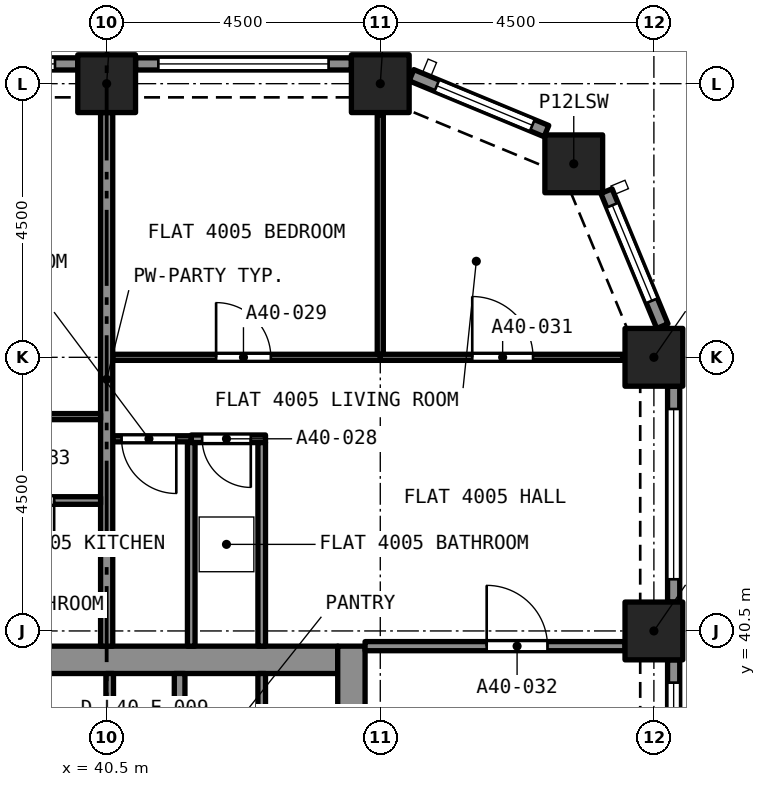
"""IFC4 building model, lengths in metres.
Left out: names, types, materials, properties, quantities, classifications, styles, units other than length and angle.
Written with IfcOpenShell. Run it as: python <this file> out.ifc"""

import sys

from ifc_helpers import new_model, si_unit, direction, frame, frame_2d, origin, origin_2d, place, context, subcontext, project, spatial, rectangle, extrude, element, fill, save


model = new_model("IFC4")
c1 = context("Model", 3, precision=1e-05, world=origin(), true_north=direction((0.0, 1.0)))
c2 = subcontext(c1, "Body", "Model", "MODEL_VIEW")
j1 = project(units=[si_unit("LENGTHUNIT", "METRE"), si_unit("PLANEANGLEUNIT", "RADIAN")], contexts=[c1])
p1 = place(None, origin())
s1 = spatial("IfcSite", under=j1, at=p1, CompositionType="ELEMENT")
p2 = place(p1, origin())
s2 = spatial("IfcBuilding", under=s1, at=p2, CompositionType="ELEMENT")
p3 = place(p2, frame((0.0, 0.0, 143.0)))
s3 = spatial("IfcBuildingStorey", under=s2, at=p3, CompositionType="ELEMENT", Elevation=143.0)
for number, where, z_axis, x_axis in (
    (1, (49.5, 40.5, 0.0), (0.0, 0.0, 1.0), (1.0, 0.0, 0.0)),
    (2, (49.5, 45.0, 0.0), (0.0, 0.0, 1.0), (1.0, 0.0, 0.0)),
    (3, (48.182, 48.182, 0.0), (0.0, 0.0, 1.0), (1.0, 0.0, 0.0)),
    (4, (40.5, 49.5, 0.0), (0.0, 0.0, 1.0), (1.0, 0.0, 0.0)),
    (5, (45.0, 49.5, 0.0), (0.0, 0.0, 1.0), (1.0, 0.0, 0.0)),
):
    element("IfcColumn", number, at=place(p3, frame(where, z_axis=z_axis, x_axis=x_axis)), inside=s3, PredefinedType="COLUMN", context=c2, shape_type="SweptSolid", body=[
        extrude(rectangle(XDim=0.95, YDim=0.95, at=origin_2d()), origin(), (0.0, 0.0, 1.0), 3.2),
    ])
p4 = place(p3, frame((36.7, 40.025, 0.0), z_axis=(0.0, 0.0, 1.0), x_axis=(1.0, 0.0, 0.0)))
e6 = element("IfcWall", 6, at=p4, inside=s3, PredefinedType="SOLIDWALL", context=c2, shape_type="SweptSolid", body=[
    extrude(rectangle(XDim=7.6, YDim=0.45, at=frame_2d((3.8, 0.0))), origin(), (0.0, 0.0, 1.0), 3.2),
])
p5 = place(p3, frame((44.525, 27.25, 0.0), z_axis=(0.0, 0.0, 1.0), x_axis=(0.0, 1.0, 0.0)))
e7 = element("IfcWall", 7, at=p5, inside=s3, PredefinedType="SOLIDWALL", context=c2, shape_type="SweptSolid", body=[
    extrude(rectangle(XDim=13.0, YDim=0.45, at=frame_2d((6.5, 0.0))), origin(), (0.0, 0.0, 1.0), 3.2),
])
p6 = place(p5, frame((8.7, 0.0, 0.0)))
e8 = element("IfcOpeningElement", 8, at=p6, cuts=e7, PredefinedType="OPENING", context=c2, shape_type="SweptSolid", body=[
    extrude(rectangle(XDim=1.2, YDim=2.1, at=frame_2d((0.6, 1.05))), frame((0.0, 0.235, 0.0), z_axis=(0.0, -1.0, 0.0), x_axis=(1.0, 0.0, 0.0)), (0.0, 0.0, 1.0), 0.47),
])
p7 = place(p3, frame((49.825, 40.025, 0.0), z_axis=(0.0, 0.0, 1.0), x_axis=(0.0, -1.0, 0.0)))
e9 = element("IfcWall", 9, at=p7, inside=s3, PredefinedType="SOLIDWALL", context=c2, shape_type="SweptSolid", body=[
    extrude(rectangle(XDim=3.55, YDim=0.2, at=frame_2d((1.775, 0.0))), origin(), (0.0, 0.0, 1.0), 3.2),
])
p8 = place(p7, frame((0.375, 0.0, 0.45)))
e10 = element("IfcOpeningElement", 10, at=p8, cuts=e9, PredefinedType="OPENING", context=c2, shape_type="SweptSolid", body=[
    extrude(rectangle(XDim=2.8, YDim=1.95, at=frame_2d((1.4, 0.975))), frame((0.0, 0.11, 0.0), z_axis=(0.0, -1.0, 0.0), x_axis=(1.0, 0.0, 0.0)), (0.0, 0.0, 1.0), 0.22),
])
p9 = place(p3, frame((49.825, 44.525, 0.0), z_axis=(0.0, 0.0, 1.0), x_axis=(0.0, -1.0, 0.0)))
e11 = element("IfcWall", 11, at=p9, inside=s3, PredefinedType="SOLIDWALL", context=c2, shape_type="SweptSolid", body=[
    extrude(rectangle(XDim=3.55, YDim=0.2, at=frame_2d((1.775, 0.0))), origin(), (0.0, 0.0, 1.0), 3.2),
])
p10 = place(p9, frame((0.375, 0.0, 0.45)))
e12 = element("IfcOpeningElement", 12, at=p10, cuts=e11, PredefinedType="OPENING", context=c2, shape_type="SweptSolid", body=[
    extrude(rectangle(XDim=2.8, YDim=1.95, at=frame_2d((1.4, 0.975))), frame((0.0, 0.11, 0.0), z_axis=(0.0, -1.0, 0.0), x_axis=(1.0, 0.0, 0.0)), (0.0, 0.0, 1.0), 0.22),
])
p11 = place(p3, frame((48.72, 47.733, 0.0), z_axis=(0.0, 0.0, 1.0), x_axis=(0.382680855588, -0.923880599843, 0.0)))
e13 = element("IfcWall", 13, at=p11, inside=s3, PredefinedType="SOLIDWALL", context=c2, shape_type="SweptSolid", body=[
    extrude(rectangle(XDim=2.403, YDim=0.2, at=frame_2d((1.201, 0.0))), origin(), (0.0, 0.0, 1.0), 3.2),
])
p12 = place(p11, frame((0.251, 0.0, 0.45)))
e14 = element("IfcOpeningElement", 14, at=p12, cuts=e13, PredefinedType="OPENING", context=c2, shape_type="SweptSolid", body=[
    extrude(rectangle(XDim=1.7, YDim=1.95, at=frame_2d((0.85, 0.975))), frame((0.0, 0.11, 0.0), z_axis=(0.0, -1.0, 0.0), x_axis=(1.0, 0.0, 0.0)), (0.0, 0.0, 1.0), 0.22),
])
p13 = place(p3, frame((45.513, 49.639, 0.0), z_axis=(0.0, 0.0, 1.0), x_axis=(0.923880599843, -0.382680855588, 0.0)))
e15 = element("IfcWall", 15, at=p13, inside=s3, PredefinedType="SOLIDWALL", context=c2, shape_type="SweptSolid", body=[
    extrude(rectangle(XDim=2.403, YDim=0.2, at=frame_2d((1.201, 0.0))), origin(), (0.0, 0.0, 1.0), 3.2),
])
p14 = place(p13, frame((0.451, 0.0, 0.45)))
e16 = element("IfcOpeningElement", 16, at=p14, cuts=e15, PredefinedType="OPENING", context=c2, shape_type="SweptSolid", body=[
    extrude(rectangle(XDim=1.7, YDim=1.95, at=frame_2d((0.85, 0.975))), frame((0.0, 0.11, 0.0), z_axis=(0.0, -1.0, 0.0), x_axis=(1.0, 0.0, 0.0)), (0.0, 0.0, 1.0), 0.22),
])
p15 = place(p3, frame((40.975, 49.825, 0.0), z_axis=(0.0, 0.0, 1.0), x_axis=(1.0, 0.0, 0.0)))
e17 = element("IfcWall", 17, at=p15, inside=s3, PredefinedType="SOLIDWALL", context=c2, shape_type="SweptSolid", body=[
    extrude(rectangle(XDim=3.55, YDim=0.2, at=frame_2d((1.775, 0.0))), origin(), (0.0, 0.0, 1.0), 3.2),
])
p16 = place(p15, frame((0.375, 0.0, 0.45)))
e18 = element("IfcOpeningElement", 18, at=p16, cuts=e17, PredefinedType="OPENING", context=c2, shape_type="SweptSolid", body=[
    extrude(rectangle(XDim=2.8, YDim=1.95, at=frame_2d((1.4, 0.975))), frame((0.0, 0.11, 0.0), z_axis=(0.0, -1.0, 0.0), x_axis=(1.0, 0.0, 0.0)), (0.0, 0.0, 1.0), 0.22),
])
p17 = place(p3, frame((36.475, 49.825, 0.0), z_axis=(0.0, 0.0, 1.0), x_axis=(1.0, 0.0, 0.0)))
e19 = element("IfcWall", 19, at=p17, inside=s3, PredefinedType="SOLIDWALL", context=c2, shape_type="SweptSolid", body=[
    extrude(rectangle(XDim=3.55, YDim=0.2, at=frame_2d((1.775, 0.0))), origin(), (0.0, 0.0, 1.0), 3.2),
])
p18 = place(p17, frame((0.375, 0.0, 0.45)))
e20 = element("IfcOpeningElement", 20, at=p18, cuts=e19, PredefinedType="OPENING", context=c2, shape_type="SweptSolid", body=[
    extrude(rectangle(XDim=2.8, YDim=1.95, at=frame_2d((1.4, 0.975))), frame((0.0, 0.11, 0.0), z_axis=(0.0, -1.0, 0.0), x_axis=(1.0, 0.0, 0.0)), (0.0, 0.0, 1.0), 0.22),
])
p19 = place(p3, frame((43.113, 43.66, 0.0), z_axis=(0.0, 0.0, 1.0), x_axis=(-1.0, 0.0, 0.0)))
e21 = element("IfcWall", 21, at=p19, inside=s3, PredefinedType="PARTITIONING", context=c2, shape_type="SweptSolid", body=[
    extrude(rectangle(XDim=1.222, YDim=0.125, at=frame_2d((0.611, 0.0))), origin(), (0.0, 0.0, 1.0), 2.9),
])
p20 = place(p19, frame((0.242, 0.0, 0.0)))
e22 = element("IfcOpeningElement", 22, at=p20, cuts=e21, PredefinedType="OPENING", context=c2, shape_type="SweptSolid", body=[
    extrude(rectangle(XDim=0.8, YDim=2.1, at=frame_2d((0.4, 1.05))), frame((0.0, 0.073, 0.0), z_axis=(0.0, -1.0, 0.0), x_axis=(1.0, 0.0, 0.0)), (0.0, 0.0, 1.0), 0.145),
])
for number, where, z_axis, x_axis in (
    (23, (43.05, 40.25, 0.0), (0.0, 0.0, 1.0), (0.0, 1.0, 0.0)),
    (24, (41.891, 40.25, 0.0), (0.0, 0.0, 1.0), (0.0, 1.0, 0.0)),
):
    element("IfcWall", number, at=place(p3, frame(where, z_axis=z_axis, x_axis=x_axis)), inside=s3, PredefinedType="PARTITIONING", context=c2, shape_type="SweptSolid", body=[
        extrude(rectangle(XDim=3.347, YDim=0.125, at=frame_2d((1.674, 0.0))), origin(), (0.0, 0.0, 1.0), 2.9),
    ])
p21 = place(p3, frame((40.6, 45.0, 0.0), z_axis=(0.0, 0.0, 1.0), x_axis=(1.0, 0.0, 0.0)))
e25 = element("IfcWall", 25, at=p21, inside=s3, PredefinedType="PARTITIONING", context=c2, shape_type="SweptSolid", body=[
    extrude(rectangle(XDim=4.4, YDim=0.1, at=frame_2d((2.2, 0.0))), origin(), (0.0, 0.0, 1.0), 2.9),
])
p22 = place(p21, frame((1.7, 0.0, 0.0)))
e26 = element("IfcOpeningElement", 26, at=p22, cuts=e25, PredefinedType="OPENING", context=c2, shape_type="SweptSolid", body=[
    extrude(rectangle(XDim=0.9, YDim=2.1, at=frame_2d((0.45, 1.05))), frame((0.0, 0.06, 0.0), z_axis=(0.0, -1.0, 0.0), x_axis=(1.0, 0.0, 0.0)), (0.0, 0.0, 1.0), 0.12),
])
p23 = place(p3, frame((45.0, 45.05, 0.0), z_axis=(0.0, 0.0, 1.0), x_axis=(0.0, 1.0, 0.0)))
e27 = element("IfcWall", 27, at=p23, inside=s3, PredefinedType="PARTITIONING", context=c2, shape_type="SweptSolid", body=[
    extrude(rectangle(XDim=3.936, YDim=0.1, at=frame_2d((1.968, 0.0))), origin(), (0.0, 0.0, 1.0), 2.9),
])
p24 = place(p3, frame((41.891, 43.66, 0.0), z_axis=(0.0, 0.0, 1.0), x_axis=(-1.0, 0.0, 0.0)))
e28 = element("IfcWall", 28, at=p24, inside=s3, PredefinedType="PARTITIONING", context=c2, shape_type="SweptSolid", body=[
    extrude(rectangle(XDim=1.291, YDim=0.1, at=frame_2d((0.646, 0.0))), origin(), (0.0, 0.0, 1.0), 2.9),
])
p25 = place(p24, frame((0.246, 0.0, 0.0)))
e29 = element("IfcOpeningElement", 29, at=p25, cuts=e28, PredefinedType="OPENING", context=c2, shape_type="SweptSolid", body=[
    extrude(rectangle(XDim=0.9, YDim=2.1, at=frame_2d((0.45, 1.05))), frame((0.0, 0.06, 0.0), z_axis=(0.0, -1.0, 0.0), x_axis=(1.0, 0.0, 0.0)), (0.0, 0.0, 1.0), 0.12),
])
p26 = place(p3, frame((45.0, 45.0, 0.0), z_axis=(0.0, 0.0, 1.0), x_axis=(1.0, 0.0, 0.0)))
e30 = element("IfcWall", 30, at=p26, inside=s3, PredefinedType="PARTITIONING", context=c2, shape_type="SweptSolid", body=[
    extrude(rectangle(XDim=3.986, YDim=0.1, at=frame_2d((1.993, 0.0))), origin(), (0.0, 0.0, 1.0), 2.9),
])
p27 = place(p26, frame((1.512, 0.0, 0.0)))
e31 = element("IfcOpeningElement", 31, at=p27, cuts=e30, PredefinedType="OPENING", context=c2, shape_type="SweptSolid", body=[
    extrude(rectangle(XDim=1.0, YDim=2.1, at=frame_2d((0.5, 1.05))), frame((0.0, 0.06, 0.0), z_axis=(0.0, -1.0, 0.0), x_axis=(1.0, 0.0, 0.0)), (0.0, 0.0, 1.0), 0.12),
])
p28 = place(p3, frame((44.75, 40.25, 0.0), z_axis=(0.0, 0.0, 1.0), x_axis=(1.0, 0.0, 0.0)))
e32 = element("IfcWall", 32, at=p28, inside=s3, PredefinedType="PARTITIONING", context=c2, shape_type="SweptSolid", body=[
    extrude(rectangle(XDim=4.275, YDim=0.15, at=frame_2d((2.137, 0.0))), origin(), (0.0, 0.0, 1.0), 2.9),
])
p29 = place(p28, frame((2.0, 0.0, 0.0)))
e33 = element("IfcOpeningElement", 33, at=p29, cuts=e32, PredefinedType="OPENING", context=c2, shape_type="SweptSolid", body=[
    extrude(rectangle(XDim=1.0, YDim=2.1, at=frame_2d((0.5, 1.05))), frame((0.0, 0.085, 0.0), z_axis=(0.0, -1.0, 0.0), x_axis=(1.0, 0.0, 0.0)), (0.0, 0.0, 1.0), 0.17),
])
p30 = place(p3, frame((40.5, 40.25, 0.0), z_axis=(0.0, 0.0, 1.0), x_axis=(0.0, 1.0, 0.0)))
e34 = element("IfcWall", 34, at=p30, inside=s3, PredefinedType="PARTITIONING", context=c2, shape_type="SweptSolid", body=[
    extrude(rectangle(XDim=8.775, YDim=0.2, at=frame_2d((4.387, 0.0))), origin(), (0.0, 0.0, 1.0), 2.9),
])
p31 = place(p3, frame((40.4, 42.645, 0.0), z_axis=(0.0, 0.0, 1.0), x_axis=(-1.0, 0.0, 0.0)))
e35 = element("IfcWall", 35, at=p31, inside=s3, PredefinedType="PARTITIONING", context=c2, shape_type="SweptSolid", body=[
    extrude(rectangle(XDim=2.427, YDim=0.125, at=frame_2d((1.214, 0.0))), origin(), (0.0, 0.0, 1.0), 2.9),
])
p32 = place(p31, frame((0.764, 0.0, 0.0)))
e36 = element("IfcOpeningElement", 36, at=p32, cuts=e35, PredefinedType="OPENING", context=c2, shape_type="SweptSolid", body=[
    extrude(rectangle(XDim=0.8, YDim=2.1, at=frame_2d((0.4, 1.05))), frame((0.0, 0.073, 0.0), z_axis=(0.0, -1.0, 0.0), x_axis=(1.0, 0.0, 0.0)), (0.0, 0.0, 1.0), 0.145),
])
p33 = place(p3, frame((36.0, 44.025, 0.0), z_axis=(0.0, 0.0, 1.0), x_axis=(1.0, 0.0, 0.0)))
e37 = element("IfcWall", 37, at=p33, inside=s3, PredefinedType="PARTITIONING", context=c2, shape_type="SweptSolid", body=[
    extrude(rectangle(XDim=4.4, YDim=0.1, at=frame_2d((2.2, 0.0))), origin(), (0.0, 0.0, 1.0), 2.9),
])
p34 = place(p33, frame((1.8, 0.0, 0.0)))
e38 = element("IfcOpeningElement", 38, at=p34, cuts=e37, PredefinedType="OPENING", context=c2, shape_type="SweptSolid", body=[
    extrude(rectangle(XDim=0.9, YDim=2.1, at=frame_2d((0.45, 1.05))), frame((0.0, 0.06, 0.0), z_axis=(0.0, -1.0, 0.0), x_axis=(1.0, 0.0, 0.0)), (0.0, 0.0, 1.0), 0.12),
])
p35 = place(p3, frame((41.7, 37.5, 0.0), z_axis=(0.0, 0.0, 1.0), x_axis=(0.0, 1.0, 0.0)))
e39 = element("IfcWall", 39, at=p35, inside=s3, PredefinedType="SOLIDWALL", context=c2, shape_type="SweptSolid", body=[
    extrude(rectangle(XDim=2.3, YDim=0.175, at=frame_2d((1.15, 0.0))), origin(), (0.0, 0.0, 1.0), 2.9),
])
for number, where, z_axis, x_axis in (
    (40, (43.05, 37.5, 0.0), (0.0, 0.0, 1.0), (0.0, 1.0, 0.0)),
    (41, (40.55, 37.5, 0.0), (0.0, 0.0, 1.0), (0.0, 1.0, 0.0)),
):
    element("IfcWall", number, at=place(p3, frame(where, z_axis=z_axis, x_axis=x_axis)), inside=s3, PredefinedType="PARTITIONING", context=c2, shape_type="SweptSolid", body=[
        extrude(rectangle(XDim=2.3, YDim=0.125, at=frame_2d((1.15, 0.0))), origin(), (0.0, 0.0, 1.0), 2.9),
    ])
p36 = place(p8, origin())
e42 = element("IfcWindow", 42, at=p36, inside=s3, PartitioningType="SINGLE_PANEL", PredefinedType="WINDOW", context=c2, shape_type="SweptSolid", body=[
    extrude(rectangle(XDim=2.8, YDim=1.95, at=frame_2d((1.4, 0.975))), frame((0.0, 0.03, 0.0), z_axis=(0.0, -1.0, 0.0), x_axis=(1.0, 0.0, 0.0)), (0.0, 0.0, 1.0), 0.06),
])
fill(e10, e42)
p37 = place(p10, origin())
e43 = element("IfcWindow", 43, at=p37, inside=s3, PartitioningType="SINGLE_PANEL", PredefinedType="WINDOW", context=c2, shape_type="SweptSolid", body=[
    extrude(rectangle(XDim=2.8, YDim=1.95, at=frame_2d((1.4, 0.975))), frame((0.0, 0.03, 0.0), z_axis=(0.0, -1.0, 0.0), x_axis=(1.0, 0.0, 0.0)), (0.0, 0.0, 1.0), 0.06),
])
fill(e12, e43)
p38 = place(p12, origin())
e44 = element("IfcWindow", 44, at=p38, inside=s3, PartitioningType="SINGLE_PANEL", PredefinedType="WINDOW", context=c2, shape_type="SweptSolid", body=[
    extrude(rectangle(XDim=1.7, YDim=1.95, at=frame_2d((0.85, 0.975))), frame((0.0, 0.03, 0.0), z_axis=(0.0, -1.0, 0.0), x_axis=(1.0, 0.0, 0.0)), (0.0, 0.0, 1.0), 0.06),
])
fill(e14, e44)
p39 = place(p14, origin())
e45 = element("IfcWindow", 45, at=p39, inside=s3, PartitioningType="SINGLE_PANEL", PredefinedType="WINDOW", context=c2, shape_type="SweptSolid", body=[
    extrude(rectangle(XDim=1.7, YDim=1.95, at=frame_2d((0.85, 0.975))), frame((0.0, 0.03, 0.0), z_axis=(0.0, -1.0, 0.0), x_axis=(1.0, 0.0, 0.0)), (0.0, 0.0, 1.0), 0.06),
])
fill(e16, e45)
p40 = place(p16, origin())
e46 = element("IfcWindow", 46, at=p40, inside=s3, PartitioningType="SINGLE_PANEL", PredefinedType="WINDOW", context=c2, shape_type="SweptSolid", body=[
    extrude(rectangle(XDim=2.8, YDim=1.95, at=frame_2d((1.4, 0.975))), frame((0.0, 0.03, 0.0), z_axis=(0.0, -1.0, 0.0), x_axis=(1.0, 0.0, 0.0)), (0.0, 0.0, 1.0), 0.06),
])
fill(e18, e46)
p41 = place(p18, origin())
e47 = element("IfcWindow", 47, at=p41, inside=s3, PartitioningType="SINGLE_PANEL", PredefinedType="WINDOW", context=c2, shape_type="SweptSolid", body=[
    extrude(rectangle(XDim=2.8, YDim=1.95, at=frame_2d((1.4, 0.975))), frame((0.0, 0.03, 0.0), z_axis=(0.0, -1.0, 0.0), x_axis=(1.0, 0.0, 0.0)), (0.0, 0.0, 1.0), 0.06),
])
fill(e20, e47)
p42 = place(p20, origin())
e48 = element("IfcDoor", 48, at=p42, inside=s3, OperationType="SINGLE_SWING_RIGHT", PredefinedType="DOOR", context=c2, shape_type="SweptSolid", body=[
    extrude(rectangle(XDim=0.8, YDim=2.1, at=frame_2d((0.4, 1.05))), frame((0.0, 0.025, 0.0), z_axis=(0.0, -1.0, 0.0), x_axis=(1.0, 0.0, 0.0)), (0.0, 0.0, 1.0), 0.05),
])
fill(e22, e48)
p43 = place(p22, origin())
e49 = element("IfcDoor", 49, at=p43, inside=s3, OperationType="SINGLE_SWING_LEFT", PredefinedType="DOOR", context=c2, shape_type="SweptSolid", body=[
    extrude(rectangle(XDim=0.9, YDim=2.1, at=frame_2d((0.45, 1.05))), frame((0.0, 0.025, 0.0), z_axis=(0.0, -1.0, 0.0), x_axis=(1.0, 0.0, 0.0)), (0.0, 0.0, 1.0), 0.05),
])
fill(e26, e49)
p44 = place(p25, origin())
e50 = element("IfcDoor", 50, at=p44, inside=s3, OperationType="SINGLE_SWING_RIGHT", PredefinedType="DOOR", context=c2, shape_type="SweptSolid", body=[
    extrude(rectangle(XDim=0.9, YDim=2.1, at=frame_2d((0.45, 1.05))), frame((0.0, 0.025, 0.0), z_axis=(0.0, -1.0, 0.0), x_axis=(1.0, 0.0, 0.0)), (0.0, 0.0, 1.0), 0.05),
])
fill(e29, e50)
p45 = place(p27, origin())
e51 = element("IfcDoor", 51, at=p45, inside=s3, OperationType="SINGLE_SWING_RIGHT", PredefinedType="DOOR", context=c2, shape_type="SweptSolid", body=[
    extrude(rectangle(XDim=1.0, YDim=2.1, at=frame_2d((0.5, 1.05))), frame((0.0, 0.025, 0.0), z_axis=(0.0, -1.0, 0.0), x_axis=(1.0, 0.0, 0.0)), (0.0, 0.0, 1.0), 0.05),
])
fill(e31, e51)
p46 = place(p29, origin())
e52 = element("IfcDoor", 52, at=p46, inside=s3, OperationType="SINGLE_SWING_RIGHT", PredefinedType="DOOR", context=c2, shape_type="SweptSolid", body=[
    extrude(rectangle(XDim=1.0, YDim=2.1, at=frame_2d((0.5, 1.05))), frame((0.0, 0.025, 0.0), z_axis=(0.0, -1.0, 0.0), x_axis=(1.0, 0.0, 0.0)), (0.0, 0.0, 1.0), 0.05),
])
fill(e33, e52)
p47 = place(p32, origin())
e53 = element("IfcDoor", 53, at=p47, inside=s3, OperationType="SINGLE_SWING_LEFT", PredefinedType="DOOR", context=c2, shape_type="SweptSolid", body=[
    extrude(rectangle(XDim=0.8, YDim=2.1, at=frame_2d((0.4, 1.05))), frame((0.0, 0.025, 0.0), z_axis=(0.0, -1.0, 0.0), x_axis=(1.0, 0.0, 0.0)), (0.0, 0.0, 1.0), 0.05),
])
fill(e36, e53)
save(model, sys.argv[1])
